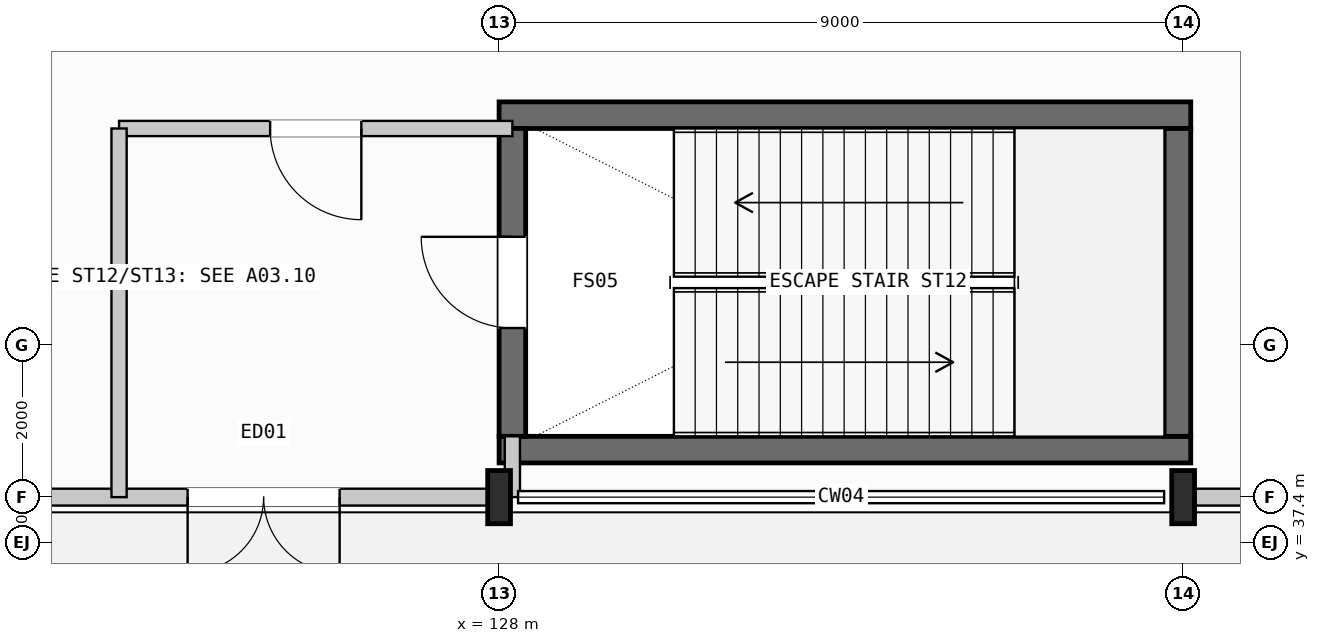
"""IFC4 building model, lengths in metres.
Left out: names, types, materials, properties, quantities, classifications, styles, units other than length and angle.
Written with IfcOpenShell. Run it as: python <this file> out.ifc"""

import sys

from ifc_helpers import new_model, si_unit, direction, frame, frame_2d, origin, origin_2d, place, context, subcontext, project, spatial, rectangle, i_section, extrude, element, fill, save


model = new_model("IFC4")
c1 = context("Model", 3, precision=1e-05, world=origin(), true_north=direction((0.0, 1.0)))
c2 = subcontext(c1, "Body", "Model", "MODEL_VIEW")
j1 = project(units=[si_unit("LENGTHUNIT", "METRE"), si_unit("PLANEANGLEUNIT", "RADIAN")], contexts=[c1])
p1 = place(None, origin())
s1 = spatial("IfcSite", under=j1, at=p1, CompositionType="ELEMENT")
p2 = place(p1, origin())
s2 = spatial("IfcBuilding", under=s1, at=p2, CompositionType="ELEMENT")
p3 = place(p2, origin())
s3 = spatial("IfcBuildingStorey", under=s2, at=p3, CompositionType="ELEMENT", Elevation=0.0)
for number, where, z_axis, x_axis in (
    (1, (128.0, 38.0, 0.0), (0.0, 0.0, 1.0), (1.0, 0.0, 0.0)),
    (2, (137.0, 38.0, 0.0), (0.0, 0.0, 1.0), (1.0, 0.0, 0.0)),
):
    element("IfcColumn", number, at=place(p3, frame(where, z_axis=z_axis, x_axis=x_axis)), inside=s3, PredefinedType="COLUMN", context=c2, shape_type="SweptSolid", body=[
        extrude(i_section(OverallWidth=0.3, OverallDepth=0.7, WebThickness=0.017, FlangeThickness=0.032, FilletRadius=0.027, at=origin_2d()), origin(), (0.0, 0.0, 1.0), 6.0),
    ])
for number, where, z_axis, x_axis in (
    (3, (128.0, 38.625, 0.0), (0.0, 0.0, 1.0), (1.0, 0.0, 0.0)),
    (4, (128.0, 43.025, 0.0), (0.0, 0.0, 1.0), (1.0, 0.0, 0.0)),
):
    element("IfcWall", number, at=place(p3, frame(where, z_axis=z_axis, x_axis=x_axis)), inside=s3, PredefinedType="SHEAR", context=c2, shape_type="SweptSolid", body=[
        extrude(rectangle(XDim=9.1, YDim=0.35, at=frame_2d((4.55, 0.0))), origin(), (0.0, 0.0, 1.0), 6.0),
    ])
p4 = place(p3, frame((128.175, 38.8, 0.0), z_axis=(0.0, 0.0, 1.0), x_axis=(0.0, 1.0, 0.0)))
e5 = element("IfcWall", 5, at=p4, inside=s3, PredefinedType="SHEAR", context=c2, shape_type="SweptSolid", body=[
    extrude(rectangle(XDim=4.05, YDim=0.35, at=frame_2d((2.025, 0.0))), origin(), (0.0, 0.0, 1.0), 6.0),
])
p5 = place(p4, frame((1.425, 0.0, 0.0)))
e6 = element("IfcOpeningElement", 6, at=p5, cuts=e5, PredefinedType="OPENING", context=c2, shape_type="SweptSolid", body=[
    extrude(rectangle(XDim=1.2, YDim=2.2, at=frame_2d((0.6, 1.1))), frame((0.0, 0.185, 0.0), z_axis=(0.0, -1.0, 0.0), x_axis=(1.0, 0.0, 0.0)), (0.0, 0.0, 1.0), 0.37),
])
p6 = place(p3, frame((136.925, 38.8, 0.0), z_axis=(0.0, 0.0, 1.0), x_axis=(0.0, 1.0, 0.0)))
e7 = element("IfcWall", 7, at=p6, inside=s3, PredefinedType="SHEAR", context=c2, shape_type="SweptSolid", body=[
    extrude(rectangle(XDim=4.05, YDim=0.35, at=frame_2d((2.025, 0.0))), origin(), (0.0, 0.0, 1.0), 6.0),
])
p7 = place(p3, frame((119.146, 38.0, 0.0), z_axis=(0.0, 0.0, 1.0), x_axis=(1.0, 0.0, 0.0)))
e8 = element("IfcWall", 8, at=p7, inside=s3, PredefinedType="STANDARD", context=c2, shape_type="SweptSolid", body=[
    extrude(rectangle(XDim=8.708, YDim=0.222, at=frame_2d((4.354, 0.0))), origin(), (0.0, 0.0, 1.0), 5.098),
])
p8 = place(p7, frame((4.756, 0.0, 0.0)))
e9 = element("IfcOpeningElement", 9, at=p8, cuts=e8, PredefinedType="OPENING", context=c2, shape_type="SweptSolid", body=[
    extrude(rectangle(XDim=2.0, YDim=2.3, at=frame_2d((1.0, 1.15))), frame((0.0, 0.121, 0.0), z_axis=(0.0, -1.0, 0.0), x_axis=(1.0, 0.0, 0.0)), (0.0, 0.0, 1.0), 0.242),
])
p9 = place(p3, frame((137.146, 38.0, 0.0), z_axis=(0.0, 0.0, 1.0), x_axis=(1.0, 0.0, 0.0)))
e10 = element("IfcWall", 10, at=p9, inside=s3, PredefinedType="STANDARD", context=c2, shape_type="SweptSolid", body=[
    extrude(rectangle(XDim=8.708, YDim=0.222, at=frame_2d((4.354, 0.0))), origin(), (0.0, 0.0, 1.0), 5.098),
])
p10 = place(p3, frame((123.0, 42.85, 0.0), z_axis=(0.0, 0.0, 1.0), x_axis=(1.0, 0.0, 0.0)))
e11 = element("IfcWall", 11, at=p10, inside=s3, PredefinedType="PARTITIONING", context=c2, shape_type="SweptSolid", body=[
    extrude(rectangle(XDim=5.175, YDim=0.2, at=frame_2d((2.587, 0.0))), origin(), (0.0, 0.0, 1.0), 4.2),
])
p11 = place(p10, frame((1.988, 0.0, 0.0)))
e12 = element("IfcOpeningElement", 12, at=p11, cuts=e11, PredefinedType="OPENING", context=c2, shape_type="SweptSolid", body=[
    extrude(rectangle(XDim=1.2, YDim=2.2, at=frame_2d((0.6, 1.1))), frame((0.0, 0.11, 0.0), z_axis=(0.0, -1.0, 0.0), x_axis=(1.0, 0.0, 0.0)), (0.0, 0.0, 1.0), 0.22),
])
p12 = place(p3, frame((123.0, 38.0, 0.0), z_axis=(0.0, 0.0, 1.0), x_axis=(0.0, 1.0, 0.0)))
e13 = element("IfcWall", 13, at=p12, inside=s3, PredefinedType="PARTITIONING", context=c2, shape_type="SweptSolid", body=[
    extrude(rectangle(XDim=4.85, YDim=0.2, at=frame_2d((2.425, 0.0))), origin(), (0.0, 0.0, 1.0), 4.2),
])
p13 = place(p3, frame((128.175, 38.0, 0.0), z_axis=(0.0, 0.0, 1.0), x_axis=(0.0, 1.0, 0.0)))
e14 = element("IfcWall", 14, at=p13, inside=s3, PredefinedType="PARTITIONING", context=c2, shape_type="SweptSolid", body=[
    extrude(rectangle(XDim=0.8, YDim=0.2, at=frame_2d((0.4, 0.0))), origin(), (0.0, 0.0, 1.0), 4.2),
])
p14 = place(p5, origin())
e15 = element("IfcDoor", 15, at=p14, inside=s3, OperationType="SINGLE_SWING_RIGHT", PredefinedType="DOOR", context=c2, shape_type="SweptSolid", body=[
    extrude(rectangle(XDim=1.2, YDim=2.2, at=frame_2d((0.6, 1.1))), frame((0.0, 0.025, 0.0), z_axis=(0.0, -1.0, 0.0), x_axis=(1.0, 0.0, 0.0)), (0.0, 0.0, 1.0), 0.05),
])
fill(e6, e15)
p15 = place(p8, frame((2.0, 0.0, 0.0), z_axis=(0.0, 0.0, 1.0), x_axis=(-1.0, 0.0, 0.0)))
e16 = element("IfcDoor", 16, at=p15, inside=s3, OperationType="DOUBLE_DOOR_SINGLE_SWING", PredefinedType="DOOR", context=c2, shape_type="SweptSolid", body=[
    extrude(rectangle(XDim=2.0, YDim=2.3, at=frame_2d((1.0, 1.15))), frame((0.0, 0.025, 0.0), z_axis=(0.0, -1.0, 0.0), x_axis=(1.0, 0.0, 0.0)), (0.0, 0.0, 1.0), 0.05),
])
fill(e9, e16)
p16 = place(p11, frame((1.2, 0.0, 0.0), z_axis=(0.0, 0.0, 1.0), x_axis=(-1.0, 0.0, 0.0)))
e17 = element("IfcDoor", 17, at=p16, inside=s3, OperationType="SINGLE_SWING_LEFT", PredefinedType="DOOR", context=c2, shape_type="SweptSolid", body=[
    extrude(rectangle(XDim=1.2, YDim=2.2, at=frame_2d((0.6, 1.1))), frame((0.0, 0.025, 0.0), z_axis=(0.0, -1.0, 0.0), x_axis=(1.0, 0.0, 0.0)), (0.0, 0.0, 1.0), 0.05),
])
fill(e12, e17)
save(model, sys.argv[1])
